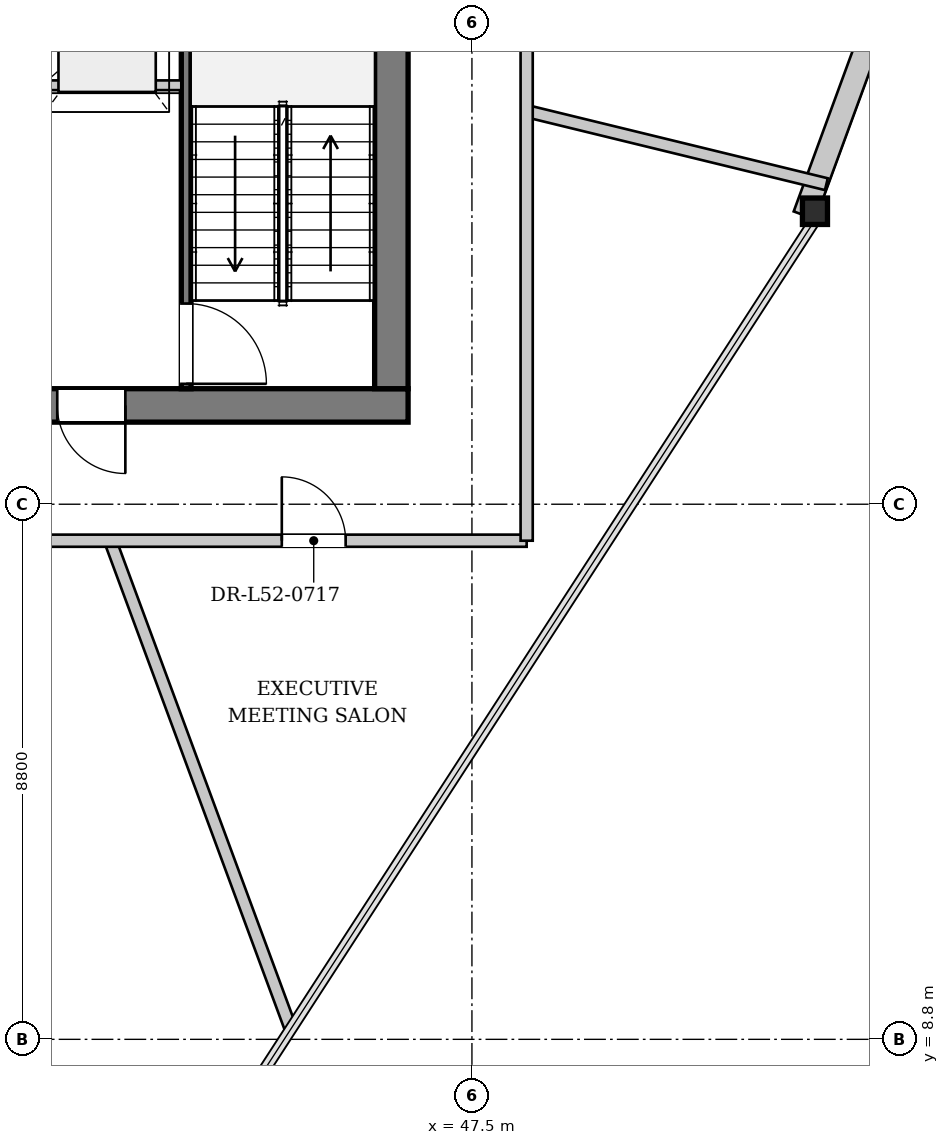
"""IFC4 building model, lengths in metres.
Left out: names, types, materials, properties, quantities, classifications, styles, units other than length and angle.
Written with IfcOpenShell. Run it as: python <this file> out.ifc"""

import sys

from ifc_helpers import new_model, si_unit, direction, frame, frame_2d, origin, origin_2d, place, context, subcontext, project, spatial, rectangle, i_section, extrude, source, transform, mapped, element, fill, save


model = new_model("IFC4")
c1 = context("Model", 3, precision=1e-05, world=origin(), true_north=direction((0.0, 1.0)))
c2 = subcontext(c1, "Body", "Model", "MODEL_VIEW")
j1 = project(units=[si_unit("LENGTHUNIT", "METRE"), si_unit("PLANEANGLEUNIT", "RADIAN")], contexts=[c1])
p1 = place(None, origin())
s1 = spatial("IfcSite", under=j1, at=p1, CompositionType="ELEMENT")
p2 = place(p1, origin())
s2 = spatial("IfcBuilding", under=s1, at=p2, CompositionType="ELEMENT")
p3 = place(p2, frame((0.0, 0.0, 196.3)))
s3 = spatial("IfcBuildingStorey", under=s2, at=p3, CompositionType="ELEMENT", Elevation=196.3)
m1 = source(origin(), c2, "Body", "SweptSolid", [
    extrude(i_section(OverallWidth=0.412, OverallDepth=0.435, WebThickness=0.031, FlangeThickness=0.05, at=origin_2d()), origin(), (0.0, 0.0, 1.0), 3.844),
])
p4 = place(p3, frame((53.149, 22.284, 0.0), z_axis=(-0.003746862239, 0.069793247462, 0.997554441438), x_axis=(-0.99856205882, -0.053607972221, 0.0)))
e1 = element("IfcColumn", 1, at=p4, inside=s3, PredefinedType="COLUMN", context=c2, shape_type="MappedRepresentation", body=[
    mapped(m1, transform((0.0, 0.0, 0.0), x_axis=(1.0, 0.0, 0.0), y_axis=(0.0, 1.0, 0.0), z_axis=(0.0, 0.0, 1.0), scale=1.0)),
])
p5 = place(p3, frame((60.964, 44.122, 0.0), z_axis=(0.0, 0.0, 1.0), x_axis=(-0.344663194366, -0.938726415123, 0.0)))
e2 = element("IfcWall", 2, at=p5, inside=s3, PredefinedType="SOLIDWALL", context=c2, shape_type="SweptSolid", body=[
    extrude(rectangle(XDim=23.193, YDim=0.38, at=frame_2d((11.597, 0.0))), origin(), (0.0, 0.0, 1.0), 3.172),
])
p6 = place(p5, frame((6.244, 0.0, 0.252)))
e3 = element("IfcOpeningElement", 3, at=p6, cuts=e2, PredefinedType="OPENING", context=c2, shape_type="SweptSolid", body=[
    extrude(rectangle(XDim=2.0, YDim=2.8, at=frame_2d((1.0, 1.4))), frame((0.0, 0.2, 0.0), z_axis=(0.0, -1.0, 0.0), x_axis=(1.0, 0.0, 0.0)), (0.0, 0.0, 1.0), 0.4),
])
p7 = place(p5, frame((15.699, 0.0, 0.252)))
e4 = element("IfcOpeningElement", 4, at=p7, cuts=e2, PredefinedType="OPENING", context=c2, shape_type="SweptSolid", body=[
    extrude(rectangle(XDim=2.0, YDim=2.8, at=frame_2d((1.0, 1.4))), frame((0.0, 0.2, 0.0), z_axis=(0.0, -1.0, 0.0), x_axis=(1.0, 0.0, 0.0)), (0.0, 0.0, 1.0), 0.4),
])
p8 = place(p3, frame((46.45, 19.225, 0.0), z_axis=(0.0, 0.0, 1.0), x_axis=(-1.0, 0.0, 0.0)))
e5 = element("IfcWall", 5, at=p8, inside=s3, PredefinedType="SHEAR", context=c2, shape_type="SweptSolid", body=[
    extrude(rectangle(XDim=16.9, YDim=0.55, at=frame_2d((8.45, 0.0))), origin(), (0.0, 0.0, 1.0), 3.78),
])
p9 = place(p8, frame((4.65, 0.0, 0.0)))
e6 = element("IfcOpeningElement", 6, at=p9, cuts=e5, PredefinedType="OPENING", context=c2, shape_type="SweptSolid", body=[
    extrude(rectangle(XDim=1.12, YDim=2.25, at=frame_2d((0.56, 1.125))), frame((0.0, 0.285, 0.0), z_axis=(0.0, -1.0, 0.0), x_axis=(1.0, 0.0, 0.0)), (0.0, 0.0, 1.0), 0.57),
])
p10 = place(p8, frame((11.15, 0.0, 0.0)))
e7 = element("IfcOpeningElement", 7, at=p10, cuts=e5, PredefinedType="OPENING", context=c2, shape_type="SweptSolid", body=[
    extrude(rectangle(XDim=1.12, YDim=2.25, at=frame_2d((0.56, 1.125))), frame((0.0, 0.285, 0.0), z_axis=(0.0, -1.0, 0.0), x_axis=(1.0, 0.0, 0.0)), (0.0, 0.0, 1.0), 0.57),
])
p11 = place(p3, frame((46.175, 33.7, 0.0), z_axis=(0.0, 0.0, 1.0), x_axis=(0.0, -1.0, 0.0)))
e8 = element("IfcWall", 8, at=p11, inside=s3, PredefinedType="SHEAR", context=c2, shape_type="SweptSolid", body=[
    extrude(rectangle(XDim=14.2, YDim=0.55, at=frame_2d((7.1, 0.0))), origin(), (0.0, 0.0, 1.0), 3.78),
])
p12 = place(p11, frame((5.18, 0.0, 0.0)))
e9 = element("IfcOpeningElement", 9, at=p12, cuts=e8, PredefinedType="OPENING", context=c2, shape_type="SweptSolid", body=[
    extrude(rectangle(XDim=1.6, YDim=2.2, at=frame_2d((0.8, 1.1))), frame((0.0, 0.285, 0.0), z_axis=(0.0, -1.0, 0.0), x_axis=(1.0, 0.0, 0.0)), (0.0, 0.0, 1.0), 0.57),
])
p13 = place(p11, frame((2.05, 0.0, 0.0)))
e10 = element("IfcOpeningElement", 10, at=p13, cuts=e8, PredefinedType="OPENING", context=c2, shape_type="SweptSolid", body=[
    extrude(rectangle(XDim=0.95, YDim=2.1, at=frame_2d((0.475, 1.05))), frame((0.0, 0.285, 0.0), z_axis=(0.0, -1.0, 0.0), x_axis=(1.0, 0.0, 0.0)), (0.0, 0.0, 1.0), 0.57),
])
p14 = place(p3, frame((42.8, 26.96, 0.0), z_axis=(0.0, 0.0, 1.0), x_axis=(0.0, -1.0, 0.0)))
e11 = element("IfcWall", 11, at=p14, inside=s3, PredefinedType="PARTITIONING", context=c2, shape_type="SweptSolid", body=[
    extrude(rectangle(XDim=7.46, YDim=0.16, at=frame_2d((3.73, 0.0))), origin(), (0.0, 0.0, 1.0), 3.78),
])
p15 = place(p14, frame((6.06, 0.0, 0.0)))
e12 = element("IfcOpeningElement", 12, at=p15, cuts=e11, PredefinedType="OPENING", context=c2, shape_type="SweptSolid", body=[
    extrude(rectangle(XDim=1.32, YDim=2.2, at=frame_2d((0.66, 1.1))), frame((0.0, 0.09, 0.0), z_axis=(0.0, -1.0, 0.0), x_axis=(1.0, 0.0, 0.0)), (0.0, 0.0, 1.0), 0.18),
])
p16 = place(p3, frame((33.28, 24.49, 0.0), z_axis=(0.0, 0.0, 1.0), x_axis=(1.0, 0.0, 0.0)))
e13 = element("IfcWall", 13, at=p16, inside=s3, PredefinedType="PARTITIONING", context=c2, shape_type="SweptSolid", body=[
    extrude(rectangle(XDim=9.44, YDim=0.16, at=frame_2d((4.72, 0.0))), origin(), (0.0, 0.0, 1.0), 3.78),
])
p17 = place(p16, frame((0.85, 0.0, 0.95)))
e14 = element("IfcOpeningElement", 14, at=p17, cuts=e13, PredefinedType="OPENING", context=c2, shape_type="SweptSolid", body=[
    extrude(rectangle(XDim=1.4, YDim=1.8, at=frame_2d((0.7, 0.9))), frame((0.0, 0.09, 0.0), z_axis=(0.0, -1.0, 0.0), x_axis=(1.0, 0.0, 0.0)), (0.0, 0.0, 1.0), 0.18),
])
p18 = place(p3, frame((41.551, 17.0, 0.0), z_axis=(0.0, 0.0, 1.0), x_axis=(0.346945907762, -0.937885140669, 0.0)))
e15 = element("IfcWall", 15, at=p18, inside=s3, PredefinedType="PARTITIONING", context=c2, shape_type="SweptSolid", body=[
    extrude(rectangle(XDim=8.525, YDim=0.2, at=frame_2d((4.263, 0.0))), origin(), (0.0, 0.0, 1.0), 3.78),
])
p19 = place(p3, frame((48.4, 24.065, 0.0), z_axis=(0.0, 0.0, 1.0), x_axis=(0.971549510185, -0.236836545447, 0.0)))
e16 = element("IfcWall", 16, at=p19, inside=s3, PredefinedType="PARTITIONING", context=c2, shape_type="SweptSolid", body=[
    extrude(rectangle(XDim=5.074, YDim=0.2, at=frame_2d((2.537, 0.0))), origin(), (0.0, 0.0, 1.0), 3.315),
])
p20 = place(p3, frame((27.6, 17.0, 0.0), z_axis=(0.0, 0.0, 1.0), x_axis=(1.0, 0.0, 0.0)))
e17 = element("IfcWall", 17, at=p20, inside=s3, PredefinedType="PARTITIONING", context=c2, shape_type="SweptSolid", body=[
    extrude(rectangle(XDim=20.8, YDim=0.2, at=frame_2d((10.4, 0.0))), origin(), (0.0, 0.0, 1.0), 3.78),
])
p21 = place(p20, frame((0.3, 0.0, 0.0)))
e18 = element("IfcOpeningElement", 18, at=p21, cuts=e17, PredefinedType="OPENING", context=c2, shape_type="SweptSolid", body=[
    extrude(rectangle(XDim=1.05, YDim=2.2, at=frame_2d((0.525, 1.1))), frame((0.0, 0.11, 0.0), z_axis=(0.0, -1.0, 0.0), x_axis=(1.0, 0.0, 0.0)), (0.0, 0.0, 1.0), 0.22),
])
p22 = place(p20, frame((9.5, 0.0, 0.0)))
e19 = element("IfcOpeningElement", 19, at=p22, cuts=e17, PredefinedType="OPENING", context=c2, shape_type="SweptSolid", body=[
    extrude(rectangle(XDim=1.05, YDim=2.2, at=frame_2d((0.525, 1.1))), frame((0.0, 0.11, 0.0), z_axis=(0.0, -1.0, 0.0), x_axis=(1.0, 0.0, 0.0)), (0.0, 0.0, 1.0), 0.22),
])
p23 = place(p20, frame((16.773, 0.0, 0.0)))
e20 = element("IfcOpeningElement", 20, at=p23, cuts=e17, PredefinedType="OPENING", context=c2, shape_type="SweptSolid", body=[
    extrude(rectangle(XDim=1.05, YDim=2.2, at=frame_2d((0.525, 1.1))), frame((0.0, 0.11, 0.0), z_axis=(0.0, -1.0, 0.0), x_axis=(1.0, 0.0, 0.0)), (0.0, 0.0, 1.0), 0.22),
])
p24 = place(p3, frame((48.4, 17.0, 0.0), z_axis=(0.0, 0.0, 1.0), x_axis=(0.0, 1.0, 0.0)))
e21 = element("IfcWall", 21, at=p24, inside=s3, PredefinedType="PARTITIONING", context=c2, shape_type="SweptSolid", body=[
    extrude(rectangle(XDim=19.2, YDim=0.2, at=frame_2d((9.6, 0.0))), origin(), (0.0, 0.0, 1.0), 3.78),
])
p25 = place(p24, frame((10.688, 0.0, 0.0)))
e22 = element("IfcOpeningElement", 22, at=p25, cuts=e21, PredefinedType="OPENING", context=c2, shape_type="SweptSolid", body=[
    extrude(rectangle(XDim=1.05, YDim=2.2, at=frame_2d((0.525, 1.1))), frame((0.0, 0.11, 0.0), z_axis=(0.0, -1.0, 0.0), x_axis=(1.0, 0.0, 0.0)), (0.0, 0.0, 1.0), 0.22),
])
m2 = source(origin(), c2, "Body", "SweptSolid", [
    extrude(rectangle(XDim=1.12, YDim=2.25, at=frame_2d((0.56, 1.125))), frame((0.0, 0.025, 0.0), z_axis=(0.0, -1.0, 0.0), x_axis=(1.0, 0.0, 0.0)), (0.0, 0.0, 1.0), 0.05),
])
p26 = place(p9, origin())
e23 = element("IfcDoor", 23, at=p26, inside=s3, OperationType="SINGLE_SWING_LEFT", PredefinedType="DOOR", context=c2, shape_type="MappedRepresentation", body=[
    mapped(m2, transform((0.0, 0.0, 0.0), x_axis=(1.0, 0.0, 0.0), y_axis=(0.0, 1.0, 0.0), z_axis=(0.0, 0.0, 1.0), scale=1.0)),
])
fill(e6, e23)
m3 = source(origin(), c2, "Body", "SweptSolid", [
    extrude(rectangle(XDim=1.32, YDim=2.2, at=frame_2d((0.66, 1.1))), frame((0.0, 0.025, 0.0), z_axis=(0.0, -1.0, 0.0), x_axis=(1.0, 0.0, 0.0)), (0.0, 0.0, 1.0), 0.05),
])
p27 = place(p15, origin())
e24 = element("IfcDoor", 24, at=p27, inside=s3, OperationType="SINGLE_SWING_RIGHT", PredefinedType="DOOR", context=c2, shape_type="MappedRepresentation", body=[
    mapped(m3, transform((0.0, 0.0, 0.0), x_axis=(1.0, 0.0, 0.0), y_axis=(0.0, 1.0, 0.0), z_axis=(0.0, 0.0, 1.0), scale=1.0)),
])
fill(e12, e24)
m4 = source(origin(), c2, "Body", "SweptSolid", [
    extrude(rectangle(XDim=1.05, YDim=2.2, at=frame_2d((0.525, 1.1))), frame((0.0, 0.025, 0.0), z_axis=(0.0, -1.0, 0.0), x_axis=(1.0, 0.0, 0.0)), (0.0, 0.0, 1.0), 0.05),
])
p28 = place(p23, origin())
e25 = element("IfcDoor", 25, at=p28, inside=s3, OperationType="SINGLE_SWING_LEFT", PredefinedType="DOOR", context=c2, shape_type="MappedRepresentation", body=[
    mapped(m4, transform((0.0, 0.0, 0.0), x_axis=(1.0, 0.0, 0.0), y_axis=(0.0, 1.0, 0.0), z_axis=(0.0, 0.0, 1.0), scale=1.0)),
])
fill(e20, e25)
save(model, sys.argv[1])
